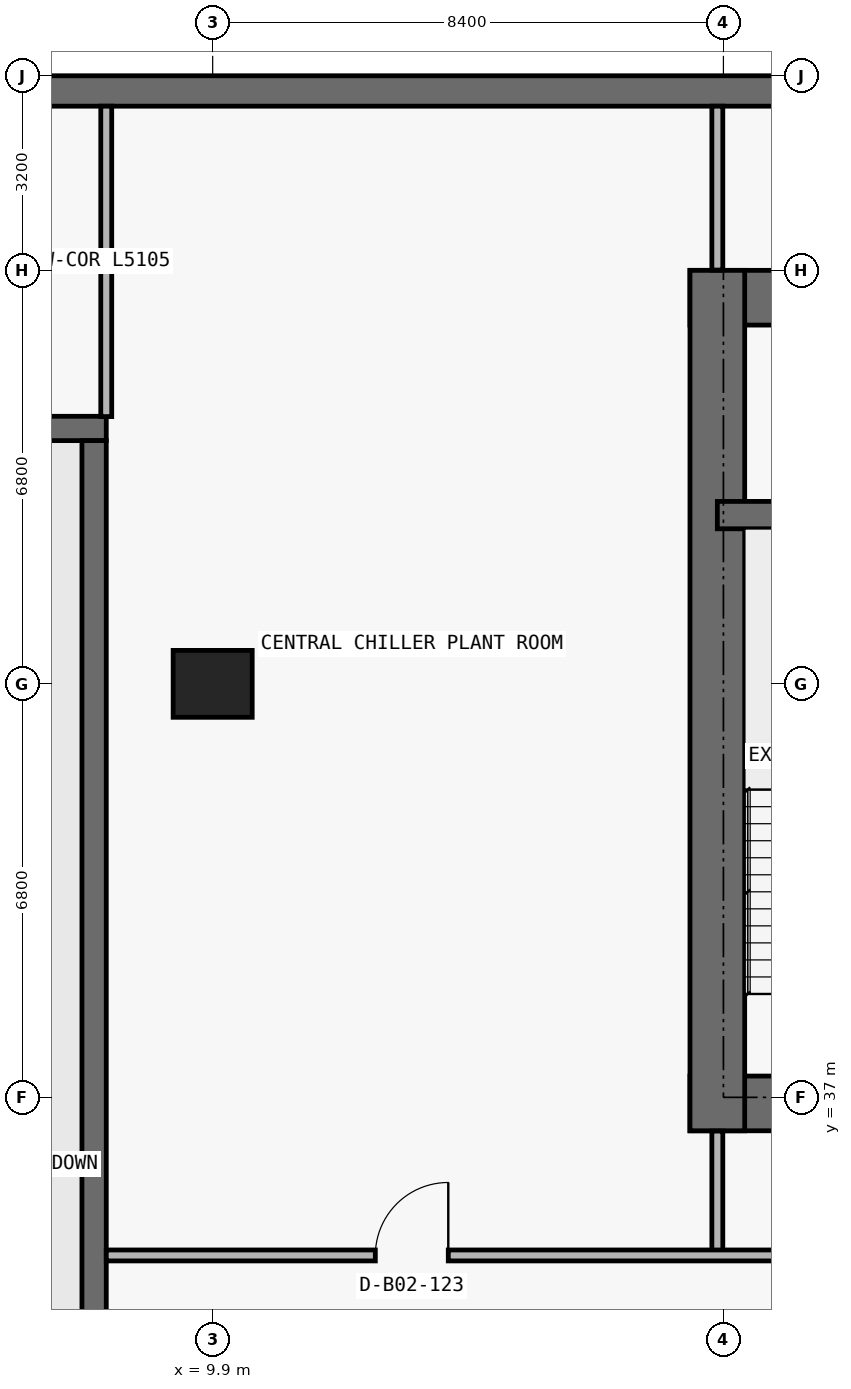
"""IFC4 building model, lengths in metres.
Left out: names, types, materials, properties, quantities, classifications, styles, units other than length and angle.
Written with IfcOpenShell. Run it as: python <this file> out.ifc"""

import sys

from ifc_helpers import new_model, si_unit, direction, frame, frame_2d, origin, origin_2d, place, context, subcontext, project, spatial, rectangle, extrude, element, fill, save


model = new_model("IFC4")
c1 = context("Model", 3, precision=1e-05, world=origin(), true_north=direction((0.0, 1.0)))
c2 = subcontext(c1, "Body", "Model", "MODEL_VIEW")
j1 = project(units=[si_unit("LENGTHUNIT", "METRE"), si_unit("PLANEANGLEUNIT", "RADIAN")], contexts=[c1])
p1 = place(None, origin())
s1 = spatial("IfcSite", under=j1, at=p1, CompositionType="ELEMENT")
p2 = place(p1, origin())
s2 = spatial("IfcBuilding", under=s1, at=p2, CompositionType="ELEMENT")
p3 = place(p2, frame((0.0, 0.0, -9.0)))
s3 = spatial("IfcBuildingStorey", under=s2, at=p3, CompositionType="ELEMENT", Elevation=-9.0)
p4 = place(p3, frame((0.0, 53.55, 0.0), z_axis=(0.0, 0.0, 1.0), x_axis=(1.0, 0.0, 0.0)))
e1 = element("IfcWall", 1, at=p4, inside=s3, PredefinedType="SOLIDWALL", context=c2, shape_type="SweptSolid", body=[
    extrude(rectangle(XDim=77.8, YDim=0.5, at=frame_2d((38.9, 0.0))), origin(), (0.0, 0.0, 1.0), 4.2),
])
p5 = place(p3, frame((1.75, 48.0, 0.0), z_axis=(0.0, 0.0, 1.0), x_axis=(1.0, 0.0, 0.0)))
e2 = element("IfcWall", 2, at=p5, inside=s3, PredefinedType="SHEAR", context=c2, shape_type="SweptSolid", body=[
    extrude(rectangle(XDim=6.4, YDim=0.4, at=frame_2d((3.2, 0.0))), origin(), (0.0, 0.0, 1.0), 4.2),
])
p6 = place(p3, frame((7.95, 23.6, 0.0), z_axis=(0.0, 0.0, 1.0), x_axis=(0.0, 1.0, 0.0)))
e3 = element("IfcWall", 3, at=p6, inside=s3, PredefinedType="SHEAR", context=c2, shape_type="SweptSolid", body=[
    extrude(rectangle(XDim=24.2, YDim=0.4, at=frame_2d((12.1, 0.0))), origin(), (0.0, 0.0, 1.0), 4.2),
])
p7 = place(p3, frame((9.9, 43.8, 0.0), z_axis=(0.0, 0.0, 1.0), x_axis=(1.0, 0.0, 0.0)))
e4 = element("IfcColumn", 4, at=p7, inside=s3, PredefinedType="COLUMN", context=c2, shape_type="SweptSolid", body=[
    extrude(rectangle(XDim=1.3, YDim=1.1, at=origin_2d()), origin(), (0.0, 0.0, 1.0), 4.2),
])
p8 = place(p3, frame((17.75, 36.9, 0.0), z_axis=(0.0, 0.0, 1.0), x_axis=(1.0, 0.0, 0.0)))
e5 = element("IfcWall", 5, at=p8, inside=s3, PredefinedType="SHEAR", context=c2, shape_type="SweptSolid", body=[
    extrude(rectangle(XDim=42.3, YDim=0.9, at=frame_2d((21.15, 0.0))), origin(), (0.0, 0.0, 1.0), 4.2),
])
p9 = place(p8, frame((14.55, 0.0, 0.0)))
e6 = element("IfcOpeningElement", 6, at=p9, cuts=e5, PredefinedType="OPENING", context=c2, shape_type="SweptSolid", body=[
    extrude(rectangle(XDim=1.1, YDim=2.15, at=frame_2d((0.55, 1.075))), frame((0.0, 0.46, 0.0), z_axis=(0.0, -1.0, 0.0), x_axis=(1.0, 0.0, 0.0)), (0.0, 0.0, 1.0), 0.92),
])
p10 = place(p8, frame((6.4, 0.0, 0.0)))
e7 = element("IfcOpeningElement", 7, at=p10, cuts=e5, PredefinedType="OPENING", context=c2, shape_type="SweptSolid", body=[
    extrude(rectangle(XDim=1.05, YDim=2.15, at=frame_2d((0.525, 1.075))), frame((0.0, 0.46, 0.0), z_axis=(0.0, -1.0, 0.0), x_axis=(1.0, 0.0, 0.0)), (0.0, 0.0, 1.0), 0.92),
])
p11 = place(p8, frame((34.9, 0.0, 0.0)))
e8 = element("IfcOpeningElement", 8, at=p11, cuts=e5, PredefinedType="OPENING", context=c2, shape_type="SweptSolid", body=[
    extrude(rectangle(XDim=1.05, YDim=2.15, at=frame_2d((0.525, 1.075))), frame((0.0, 0.46, 0.0), z_axis=(0.0, -1.0, 0.0), x_axis=(1.0, 0.0, 0.0)), (0.0, 0.0, 1.0), 0.92),
])
p12 = place(p8, frame((11.012, 0.0, 0.0)))
e9 = element("IfcOpeningElement", 9, at=p12, cuts=e5, PredefinedType="OPENING", context=c2, shape_type="SweptSolid", body=[
    extrude(rectangle(XDim=1.05, YDim=2.15, at=frame_2d((0.525, 1.075))), frame((0.0, 0.46, 0.0), z_axis=(0.0, -1.0, 0.0), x_axis=(1.0, 0.0, 0.0)), (0.0, 0.0, 1.0), 0.92),
])
p13 = place(p8, frame((24.25, 0.0, 0.0)))
e10 = element("IfcOpeningElement", 10, at=p13, cuts=e5, PredefinedType="OPENING", context=c2, shape_type="SweptSolid", body=[
    extrude(rectangle(XDim=1.05, YDim=2.15, at=frame_2d((0.525, 1.075))), frame((0.0, 0.46, 0.0), z_axis=(0.0, -1.0, 0.0), x_axis=(1.0, 0.0, 0.0)), (0.0, 0.0, 1.0), 0.92),
])
p14 = place(p3, frame((17.75, 50.15, 0.0), z_axis=(0.0, 0.0, 1.0), x_axis=(1.0, 0.0, 0.0)))
e11 = element("IfcWall", 11, at=p14, inside=s3, PredefinedType="SHEAR", context=c2, shape_type="SweptSolid", body=[
    extrude(rectangle(XDim=42.3, YDim=0.9, at=frame_2d((21.15, 0.0))), origin(), (0.0, 0.0, 1.0), 4.2),
])
p15 = place(p3, frame((18.2, 36.45, 0.0), z_axis=(0.0, 0.0, 1.0), x_axis=(0.0, 1.0, 0.0)))
e12 = element("IfcWall", 12, at=p15, inside=s3, PredefinedType="SHEAR", context=c2, shape_type="SweptSolid", body=[
    extrude(rectangle(XDim=14.15, YDim=0.9, at=frame_2d((7.075, 0.0))), origin(), (0.0, 0.0, 1.0), 4.2),
])
p16 = place(p3, frame((18.2, 46.575, 0.0), z_axis=(0.0, 0.0, 1.0), x_axis=(1.0, 0.0, 0.0)))
e13 = element("IfcWall", 13, at=p16, inside=s3, PredefinedType="SHEAR", context=c2, shape_type="SweptSolid", body=[
    extrude(rectangle(XDim=41.4, YDim=0.45, at=frame_2d((20.7, 0.0))), origin(), (0.0, 0.0, 1.0), 4.2),
])
p17 = place(p16, frame((7.675, 0.0, 0.0)))
e14 = element("IfcOpeningElement", 14, at=p17, cuts=e13, PredefinedType="OPENING", context=c2, shape_type="SweptSolid", body=[
    extrude(rectangle(XDim=1.05, YDim=2.15, at=frame_2d((0.525, 1.075))), frame((0.0, 0.235, 0.0), z_axis=(0.0, -1.0, 0.0), x_axis=(1.0, 0.0, 0.0)), (0.0, 0.0, 1.0), 0.47),
])
p18 = place(p16, frame((32.725, 0.0, 0.0)))
e15 = element("IfcOpeningElement", 15, at=p18, cuts=e13, PredefinedType="OPENING", context=c2, shape_type="SweptSolid", body=[
    extrude(rectangle(XDim=1.05, YDim=2.15, at=frame_2d((0.525, 1.075))), frame((0.0, 0.235, 0.0), z_axis=(0.0, -1.0, 0.0), x_axis=(1.0, 0.0, 0.0)), (0.0, 0.0, 1.0), 0.47),
])
p19 = place(p3, frame((8.15, 48.195, 0.0), z_axis=(0.0, 0.0, 1.0), x_axis=(0.0, 1.0, 0.0)))
e16 = element("IfcWall", 16, at=p19, inside=s3, PredefinedType="PARTITIONING", context=c2, shape_type="SweptSolid", body=[
    extrude(rectangle(XDim=5.105, YDim=0.18, at=frame_2d((2.552, 0.0))), origin(), (0.0, 0.0, 1.0), 4.2),
])
p20 = place(p3, frame((18.2, 34.4, 0.0), z_axis=(0.0, 0.0, 1.0), x_axis=(0.0, 1.0, 0.0)))
e17 = element("IfcWall", 17, at=p20, inside=s3, PredefinedType="PARTITIONING", context=c2, shape_type="SweptSolid", body=[
    extrude(rectangle(XDim=2.045, YDim=0.18, at=frame_2d((1.022, 0.0))), origin(), (0.0, 0.0, 1.0), 3.085),
])
p21 = place(p3, frame((18.2, 50.605, 0.0), z_axis=(0.0, 0.0, 1.0), x_axis=(0.0, 1.0, 0.0)))
e18 = element("IfcWall", 18, at=p21, inside=s3, PredefinedType="PARTITIONING", context=c2, shape_type="SweptSolid", body=[
    extrude(rectangle(XDim=2.695, YDim=0.18, at=frame_2d((1.348, 0.0))), origin(), (0.0, 0.0, 1.0), 4.2),
])
p22 = place(p3, frame((8.15, 34.4, 0.0), z_axis=(0.0, 0.0, 1.0), x_axis=(1.0, 0.0, 0.0)))
e19 = element("IfcWall", 19, at=p22, inside=s3, PredefinedType="PARTITIONING", context=c2, shape_type="SweptSolid", body=[
    extrude(rectangle(XDim=61.5, YDim=0.18, at=frame_2d((30.75, 0.0))), origin(), (0.0, 0.0, 1.0), 4.2),
])
p23 = place(p22, frame((30.15, 0.0, 0.0)))
e20 = element("IfcOpeningElement", 20, at=p23, cuts=e19, PredefinedType="OPENING", context=c2, shape_type="SweptSolid", body=[
    extrude(rectangle(XDim=1.2, YDim=2.2, at=frame_2d((0.6, 1.1))), frame((0.0, 0.1, 0.0), z_axis=(0.0, -1.0, 0.0), x_axis=(1.0, 0.0, 0.0)), (0.0, 0.0, 1.0), 0.2),
])
p24 = place(p22, frame((4.425, 0.0, 0.0)))
e21 = element("IfcOpeningElement", 21, at=p24, cuts=e19, PredefinedType="OPENING", context=c2, shape_type="SweptSolid", body=[
    extrude(rectangle(XDim=1.2, YDim=2.2, at=frame_2d((0.6, 1.1))), frame((0.0, 0.1, 0.0), z_axis=(0.0, -1.0, 0.0), x_axis=(1.0, 0.0, 0.0)), (0.0, 0.0, 1.0), 0.2),
])
p25 = place(p22, frame((55.875, 0.0, 0.0)))
e22 = element("IfcOpeningElement", 22, at=p25, cuts=e19, PredefinedType="OPENING", context=c2, shape_type="SweptSolid", body=[
    extrude(rectangle(XDim=1.2, YDim=2.2, at=frame_2d((0.6, 1.1))), frame((0.0, 0.1, 0.0), z_axis=(0.0, -1.0, 0.0), x_axis=(1.0, 0.0, 0.0)), (0.0, 0.0, 1.0), 0.2),
])
p26 = place(p24, origin())
e23 = element("IfcDoor", 23, at=p26, inside=s3, OperationType="SINGLE_SWING_RIGHT", PredefinedType="DOOR", context=c2, shape_type="SweptSolid", body=[
    extrude(rectangle(XDim=1.2, YDim=2.2, at=frame_2d((0.6, 1.1))), frame((0.0, 0.025, 0.0), z_axis=(0.0, -1.0, 0.0), x_axis=(1.0, 0.0, 0.0)), (0.0, 0.0, 1.0), 0.05),
])
fill(e21, e23)
save(model, sys.argv[1])
